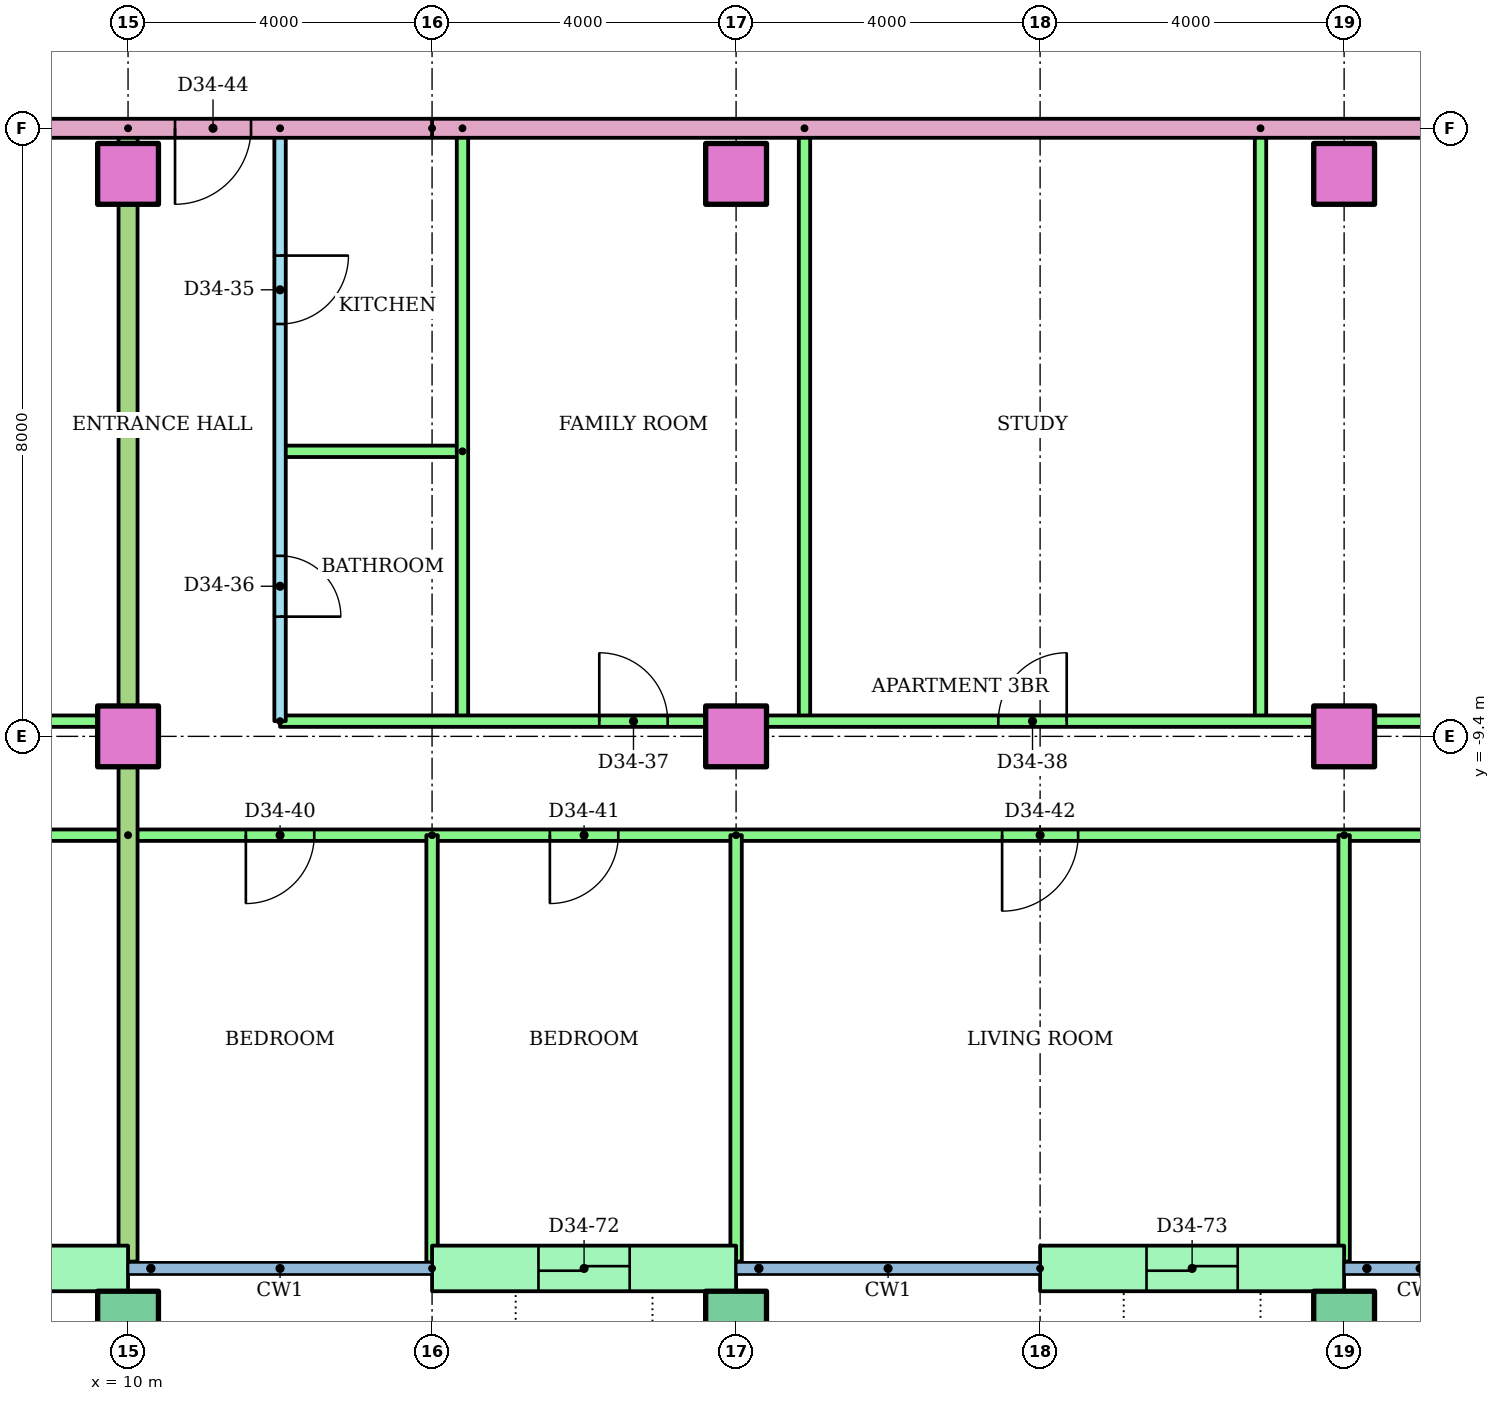
"""IFC4 building model, lengths in metres.
Left out: names, types, materials, properties, quantities, classifications, styles, units other than length and angle.
Written with IfcOpenShell. Run it as: python <this file> out.ifc"""

import sys

from ifc_helpers import new_model, si_unit, direction, frame, frame_2d, origin, origin_2d, place, context, subcontext, project, spatial, rectangle, hollow_rectangle, extrude, element, fill, save


model = new_model("IFC4")
c1 = context("Model", 3, precision=1e-05, world=origin(), true_north=direction((0.0, 1.0)))
c2 = subcontext(c1, "Body", "Model", "MODEL_VIEW")
j1 = project(units=[si_unit("LENGTHUNIT", "METRE"), si_unit("PLANEANGLEUNIT", "RADIAN")], contexts=[c1])
p1 = place(None, origin())
s1 = spatial("IfcSite", under=j1, at=p1, CompositionType="ELEMENT")
p2 = place(p1, origin())
s2 = spatial("IfcBuilding", under=s1, at=p2, CompositionType="ELEMENT")
p3 = place(p2, frame((0.0, 0.0, 132.6)))
s3 = spatial("IfcBuildingStorey", under=s2, at=p3, CompositionType="ELEMENT", Elevation=132.6)
for number, where in (
    (1, (10.0, -17.1, 0.0)),
    (2, (18.0, -17.1, 0.0)),
    (3, (26.0, -17.1, 0.0)),
):
    element("IfcColumn", number, at=place(p3, frame(where)), inside=s3, PredefinedType="COLUMN", context=c2, shape_type="SweptSolid", body=[
        extrude(hollow_rectangle(XDim=0.8, YDim=0.8, WallThickness=0.04, at=origin_2d()), origin(), (0.0, 0.0, 1.0), 3.2),
    ])
for number, where in (
    (4, (10.0, -9.4, 0.0)),
    (5, (18.0, -9.4, 0.0)),
    (6, (26.0, -9.4, 0.0)),
    (7, (10.0, -2.0, 0.0)),
    (8, (18.0, -2.0, 0.0)),
    (9, (26.0, -2.0, 0.0)),
):
    element("IfcColumn", number, at=place(p3, frame(where)), inside=s3, PredefinedType="COLUMN", context=c2, shape_type="SweptSolid", body=[
        extrude(rectangle(XDim=0.8, YDim=0.8, at=origin_2d()), origin(), (0.0, 0.0, 1.0), 3.2),
    ])
p4 = place(p3, frame((6.0, -16.4, 0.0)))
e10 = element("IfcWall", 10, at=p4, inside=s3, PredefinedType="STANDARD", context=c2, shape_type="SweptSolid", body=[
    extrude(rectangle(XDim=4.0, YDim=0.6, at=frame_2d((2.0, 0.0))), origin(), (0.0, 0.0, 1.0), 2.92),
])
p5 = place(p4, frame((1.4, 0.0, 0.0)))
e11 = element("IfcOpeningElement", 11, at=p5, cuts=e10, PredefinedType="OPENING", context=c2, shape_type="SweptSolid", body=[
    extrude(rectangle(XDim=1.2, YDim=2.1, at=frame_2d((0.6, 1.05))), frame((0.0, 0.31, 0.0), z_axis=(0.0, -1.0, 0.0), x_axis=(1.0, 0.0, 0.0)), (0.0, 0.0, 1.0), 0.62),
])
p6 = place(p3, frame((14.0, -16.4, 0.0)))
e12 = element("IfcWall", 12, at=p6, inside=s3, PredefinedType="STANDARD", context=c2, shape_type="SweptSolid", body=[
    extrude(rectangle(XDim=4.0, YDim=0.6, at=frame_2d((2.0, 0.0))), origin(), (0.0, 0.0, 1.0), 2.92),
])
p7 = place(p6, frame((1.4, 0.0, 0.0)))
e13 = element("IfcOpeningElement", 13, at=p7, cuts=e12, PredefinedType="OPENING", context=c2, shape_type="SweptSolid", body=[
    extrude(rectangle(XDim=1.2, YDim=2.1, at=frame_2d((0.6, 1.05))), frame((0.0, 0.31, 0.0), z_axis=(0.0, -1.0, 0.0), x_axis=(1.0, 0.0, 0.0)), (0.0, 0.0, 1.0), 0.62),
])
p8 = place(p3, frame((22.0, -16.4, 0.0)))
e14 = element("IfcWall", 14, at=p8, inside=s3, PredefinedType="STANDARD", context=c2, shape_type="SweptSolid", body=[
    extrude(rectangle(XDim=4.0, YDim=0.6, at=frame_2d((2.0, 0.0))), origin(), (0.0, 0.0, 1.0), 2.92),
])
p9 = place(p8, frame((1.4, 0.0, 0.0)))
e15 = element("IfcOpeningElement", 15, at=p9, cuts=e14, PredefinedType="OPENING", context=c2, shape_type="SweptSolid", body=[
    extrude(rectangle(XDim=1.2, YDim=2.1, at=frame_2d((0.6, 1.05))), frame((0.0, 0.31, 0.0), z_axis=(0.0, -1.0, 0.0), x_axis=(1.0, 0.0, 0.0)), (0.0, 0.0, 1.0), 0.62),
])
p10 = place(p3, frame((-4.0, -9.2, 0.0)))
e16 = element("IfcWall", 16, at=p10, inside=s3, PredefinedType="PARTITIONING", context=c2, shape_type="SweptSolid", body=[
    extrude(rectangle(XDim=14.0, YDim=0.15, at=frame_2d((7.0, 0.0))), origin(), (0.0, 0.0, 1.0), 2.4),
])
p11 = place(p10, frame((3.45, 0.0, 0.0)))
e17 = element("IfcOpeningElement", 17, at=p11, cuts=e16, PredefinedType="OPENING", context=c2, shape_type="SweptSolid", body=[
    extrude(rectangle(XDim=0.9, YDim=2.1, at=frame_2d((0.45, 1.05))), frame((0.0, 0.085, 0.0), z_axis=(0.0, -1.0, 0.0), x_axis=(1.0, 0.0, 0.0)), (0.0, 0.0, 1.0), 0.17),
])
p12 = place(p10, frame((6.825, 0.0, 0.0)))
e18 = element("IfcOpeningElement", 18, at=p12, cuts=e16, PredefinedType="OPENING", context=c2, shape_type="SweptSolid", body=[
    extrude(rectangle(XDim=0.9, YDim=2.1, at=frame_2d((0.45, 1.05))), frame((0.0, 0.085, 0.0), z_axis=(0.0, -1.0, 0.0), x_axis=(1.0, 0.0, 0.0)), (0.0, 0.0, 1.0), 0.17),
])
p13 = place(p10, frame((11.125, 0.0, 0.0)))
e19 = element("IfcOpeningElement", 19, at=p13, cuts=e16, PredefinedType="OPENING", context=c2, shape_type="SweptSolid", body=[
    extrude(rectangle(XDim=0.9, YDim=2.1, at=frame_2d((0.45, 1.05))), frame((0.0, 0.085, 0.0), z_axis=(0.0, -1.0, 0.0), x_axis=(1.0, 0.0, 0.0)), (0.0, 0.0, 1.0), 0.17),
])
p14 = place(p3, frame((10.0, -10.7, 0.0), z_axis=(0.0, 0.0, 1.0), x_axis=(-1.0, 0.0, 0.0)))
e20 = element("IfcWall", 20, at=p14, inside=s3, PredefinedType="PARTITIONING", context=c2, shape_type="SweptSolid", body=[
    extrude(rectangle(XDim=16.0, YDim=0.15, at=frame_2d((8.0, 0.0))), origin(), (0.0, 0.0, 1.0), 2.4),
])
p15 = place(p14, frame((13.55, 0.0, 0.0)))
e21 = element("IfcOpeningElement", 21, at=p15, cuts=e20, PredefinedType="OPENING", context=c2, shape_type="SweptSolid", body=[
    extrude(rectangle(XDim=0.9, YDim=2.1, at=frame_2d((0.45, 1.05))), frame((0.0, 0.085, 0.0), z_axis=(0.0, -1.0, 0.0), x_axis=(1.0, 0.0, 0.0)), (0.0, 0.0, 1.0), 0.17),
])
p16 = place(p14, frame((9.55, 0.0, 0.0)))
e22 = element("IfcOpeningElement", 22, at=p16, cuts=e20, PredefinedType="OPENING", context=c2, shape_type="SweptSolid", body=[
    extrude(rectangle(XDim=0.9, YDim=2.1, at=frame_2d((0.45, 1.05))), frame((0.0, 0.085, 0.0), z_axis=(0.0, -1.0, 0.0), x_axis=(1.0, 0.0, 0.0)), (0.0, 0.0, 1.0), 0.17),
])
p17 = place(p14, frame((3.5, 0.0, 0.0)))
e23 = element("IfcOpeningElement", 23, at=p17, cuts=e20, PredefinedType="OPENING", context=c2, shape_type="SweptSolid", body=[
    extrude(rectangle(XDim=1.0, YDim=2.1, at=frame_2d((0.5, 1.05))), frame((0.0, 0.085, 0.0), z_axis=(0.0, -1.0, 0.0), x_axis=(1.0, 0.0, 0.0)), (0.0, 0.0, 1.0), 0.17),
])
p18 = place(p3, frame((12.0, -1.4, 0.0), z_axis=(0.0, 0.0, 1.0), x_axis=(0.0, -1.0, 0.0)))
e24 = element("IfcWall", 24, at=p18, inside=s3, PredefinedType="PARTITIONING", context=c2, shape_type="SweptSolid", body=[
    extrude(rectangle(XDim=7.8, YDim=0.15, at=frame_2d((3.9, 0.0))), origin(), (0.0, 0.0, 1.0), 2.4),
])
p19 = place(p18, frame((1.675, 0.0, 0.0)))
e25 = element("IfcOpeningElement", 25, at=p19, cuts=e24, PredefinedType="OPENING", context=c2, shape_type="SweptSolid", body=[
    extrude(rectangle(XDim=0.9, YDim=2.1, at=frame_2d((0.45, 1.05))), frame((0.0, 0.085, 0.0), z_axis=(0.0, -1.0, 0.0), x_axis=(1.0, 0.0, 0.0)), (0.0, 0.0, 1.0), 0.17),
])
p20 = place(p18, frame((5.625, 0.0, 0.0)))
e26 = element("IfcOpeningElement", 26, at=p20, cuts=e24, PredefinedType="OPENING", context=c2, shape_type="SweptSolid", body=[
    extrude(rectangle(XDim=0.8, YDim=2.1, at=frame_2d((0.4, 1.05))), frame((0.0, 0.085, 0.0), z_axis=(0.0, -1.0, 0.0), x_axis=(1.0, 0.0, 0.0)), (0.0, 0.0, 1.0), 0.17),
])
p21 = place(p3, frame((14.4, -5.65, 0.0), z_axis=(0.0, 0.0, 1.0), x_axis=(-1.0, 0.0, 0.0)))
e27 = element("IfcWall", 27, at=p21, inside=s3, PredefinedType="PARTITIONING", context=c2, shape_type="SweptSolid", body=[
    extrude(rectangle(XDim=2.4, YDim=0.15, at=frame_2d((1.2, 0.0))), origin(), (0.0, 0.0, 1.0), 2.4),
])
for number, where, z_axis, x_axis in (
    (28, (14.4, -1.4, 0.0), (0.0, 0.0, 1.0), (0.0, -1.0, 0.0)),
    (29, (18.9, -1.4, 0.0), (0.0, 0.0, 1.0), (0.0, -1.0, 0.0)),
    (30, (24.9, -1.4, 0.0), (0.0, 0.0, 1.0), (0.0, -1.0, 0.0)),
):
    element("IfcWall", number, at=place(p3, frame(where, z_axis=z_axis, x_axis=x_axis)), inside=s3, PredefinedType="PARTITIONING", context=c2, shape_type="SweptSolid", body=[
        extrude(rectangle(XDim=7.8, YDim=0.15, at=frame_2d((3.9, 0.0))), origin(), (0.0, 0.0, 1.0), 2.4),
    ])
p22 = place(p3, frame((12.0, -9.2, 0.0)))
e31 = element("IfcWall", 31, at=p22, inside=s3, PredefinedType="PARTITIONING", context=c2, shape_type="SweptSolid", body=[
    extrude(rectangle(XDim=20.72, YDim=0.15, at=frame_2d((10.36, 0.0))), origin(), (0.0, 0.0, 1.0), 2.4),
])
p23 = place(p22, frame((4.2, 0.0, 0.0)))
e32 = element("IfcOpeningElement", 32, at=p23, cuts=e31, PredefinedType="OPENING", context=c2, shape_type="SweptSolid", body=[
    extrude(rectangle(XDim=0.9, YDim=2.1, at=frame_2d((0.45, 1.05))), frame((0.0, 0.085, 0.0), z_axis=(0.0, -1.0, 0.0), x_axis=(1.0, 0.0, 0.0)), (0.0, 0.0, 1.0), 0.17),
])
p24 = place(p22, frame((9.45, 0.0, 0.0)))
e33 = element("IfcOpeningElement", 33, at=p24, cuts=e31, PredefinedType="OPENING", context=c2, shape_type="SweptSolid", body=[
    extrude(rectangle(XDim=0.9, YDim=2.1, at=frame_2d((0.45, 1.05))), frame((0.0, 0.085, 0.0), z_axis=(0.0, -1.0, 0.0), x_axis=(1.0, 0.0, 0.0)), (0.0, 0.0, 1.0), 0.17),
])
p25 = place(p22, frame((16.25, 0.0, 0.0)))
e34 = element("IfcOpeningElement", 34, at=p25, cuts=e31, PredefinedType="OPENING", context=c2, shape_type="SweptSolid", body=[
    extrude(rectangle(XDim=0.9, YDim=2.1, at=frame_2d((0.45, 1.05))), frame((0.0, 0.085, 0.0), z_axis=(0.0, -1.0, 0.0), x_axis=(1.0, 0.0, 0.0)), (0.0, 0.0, 1.0), 0.17),
])
p26 = place(p3, frame((32.72, -10.7, 0.0), z_axis=(0.0, 0.0, 1.0), x_axis=(-1.0, 0.0, 0.0)))
e35 = element("IfcWall", 35, at=p26, inside=s3, PredefinedType="PARTITIONING", context=c2, shape_type="SweptSolid", body=[
    extrude(rectangle(XDim=22.72, YDim=0.15, at=frame_2d((11.36, 0.0))), origin(), (0.0, 0.0, 1.0), 2.4),
])
p27 = place(p26, frame((20.27, 0.0, 0.0)))
e36 = element("IfcOpeningElement", 36, at=p27, cuts=e35, PredefinedType="OPENING", context=c2, shape_type="SweptSolid", body=[
    extrude(rectangle(XDim=0.9, YDim=2.1, at=frame_2d((0.45, 1.05))), frame((0.0, 0.085, 0.0), z_axis=(0.0, -1.0, 0.0), x_axis=(1.0, 0.0, 0.0)), (0.0, 0.0, 1.0), 0.17),
])
p28 = place(p26, frame((16.27, 0.0, 0.0)))
e37 = element("IfcOpeningElement", 37, at=p28, cuts=e35, PredefinedType="OPENING", context=c2, shape_type="SweptSolid", body=[
    extrude(rectangle(XDim=0.9, YDim=2.1, at=frame_2d((0.45, 1.05))), frame((0.0, 0.085, 0.0), z_axis=(0.0, -1.0, 0.0), x_axis=(1.0, 0.0, 0.0)), (0.0, 0.0, 1.0), 0.17),
])
p29 = place(p26, frame((10.22, 0.0, 0.0)))
e38 = element("IfcOpeningElement", 38, at=p29, cuts=e35, PredefinedType="OPENING", context=c2, shape_type="SweptSolid", body=[
    extrude(rectangle(XDim=1.0, YDim=2.1, at=frame_2d((0.5, 1.05))), frame((0.0, 0.085, 0.0), z_axis=(0.0, -1.0, 0.0), x_axis=(1.0, 0.0, 0.0)), (0.0, 0.0, 1.0), 0.17),
])
p30 = place(p26, frame((3.02, 0.0, 0.0)))
e39 = element("IfcOpeningElement", 39, at=p30, cuts=e35, PredefinedType="OPENING", context=c2, shape_type="SweptSolid", body=[
    extrude(rectangle(XDim=0.9, YDim=2.1, at=frame_2d((0.45, 1.05))), frame((0.0, 0.085, 0.0), z_axis=(0.0, -1.0, 0.0), x_axis=(1.0, 0.0, 0.0)), (0.0, 0.0, 1.0), 0.17),
])
p31 = place(p3, frame((14.0, -10.7, 0.0), z_axis=(0.0, 0.0, 1.0), x_axis=(0.0, -1.0, 0.0)))
e40 = element("IfcWall", 40, at=p31, inside=s3, PredefinedType="PARTITIONING", context=c2, shape_type="SweptSolid", body=[
    extrude(rectangle(XDim=5.621, YDim=0.15, at=frame_2d((2.811, 0.0))), origin(), (0.0, 0.0, 1.0), 2.4),
])
for number, where, z_axis, x_axis in (
    (41, (18.0, -10.7, 0.0), (0.0, 0.0, 1.0), (0.0, -1.0, 0.0)),
    (42, (26.0, -10.7, 0.0), (0.0, 0.0, 1.0), (0.0, -1.0, 0.0)),
):
    element("IfcWall", number, at=place(p3, frame(where, z_axis=z_axis, x_axis=x_axis)), inside=s3, PredefinedType="PARTITIONING", context=c2, shape_type="SweptSolid", body=[
        extrude(rectangle(XDim=5.61, YDim=0.15, at=frame_2d((2.805, 0.0))), origin(), (0.0, 0.0, 1.0), 2.4),
    ])
p32 = place(p3, frame((10.0, -1.4, 0.0), z_axis=(0.0, 0.0, 1.0), x_axis=(0.0, -1.0, 0.0)))
e43 = element("IfcWall", 43, at=p32, inside=s3, PredefinedType="PARTITIONING", context=c2, shape_type="SweptSolid", body=[
    extrude(rectangle(XDim=14.91, YDim=0.25, at=frame_2d((7.455, 0.0))), origin(), (0.0, 0.0, 1.0), 2.4),
])
p33 = place(p3, frame((29.0, -1.4, 0.0), z_axis=(0.0, 0.0, 1.0), x_axis=(-1.0, 0.0, 0.0)))
e44 = element("IfcWall", 44, at=p33, inside=s3, PredefinedType="PARTITIONING", context=c2, shape_type="SweptSolid", body=[
    extrude(rectangle(XDim=15.0, YDim=0.25, at=frame_2d((7.5, 0.0))), origin(), (0.0, 0.0, 1.0), 2.4),
])
p34 = place(p3, frame((14.0, -1.4, 0.0), z_axis=(0.0, 0.0, 1.0), x_axis=(-1.0, 0.0, 0.0)))
e45 = element("IfcWall", 45, at=p34, inside=s3, PredefinedType="PARTITIONING", context=c2, shape_type="SweptSolid", body=[
    extrude(rectangle(XDim=28.0, YDim=0.25, at=frame_2d((14.0, 0.0))), origin(), (0.0, 0.0, 1.0), 2.4),
])
p35 = place(p34, frame((20.618, 0.0, 0.0)))
e46 = element("IfcOpeningElement", 46, at=p35, cuts=e45, PredefinedType="OPENING", context=c2, shape_type="SweptSolid", body=[
    extrude(rectangle(XDim=1.0, YDim=2.1, at=frame_2d((0.5, 1.05))), frame((0.0, 0.135, 0.0), z_axis=(0.0, -1.0, 0.0), x_axis=(1.0, 0.0, 0.0)), (0.0, 0.0, 1.0), 0.27),
])
p36 = place(p34, frame((18.382, 0.0, 0.0)))
e47 = element("IfcOpeningElement", 47, at=p36, cuts=e45, PredefinedType="OPENING", context=c2, shape_type="SweptSolid", body=[
    extrude(rectangle(XDim=1.0, YDim=2.1, at=frame_2d((0.5, 1.05))), frame((0.0, 0.135, 0.0), z_axis=(0.0, -1.0, 0.0), x_axis=(1.0, 0.0, 0.0)), (0.0, 0.0, 1.0), 0.27),
])
p37 = place(p34, frame((2.382, 0.0, 0.0)))
e48 = element("IfcOpeningElement", 48, at=p37, cuts=e45, PredefinedType="OPENING", context=c2, shape_type="SweptSolid", body=[
    extrude(rectangle(XDim=1.0, YDim=2.1, at=frame_2d((0.5, 1.05))), frame((0.0, 0.135, 0.0), z_axis=(0.0, -1.0, 0.0), x_axis=(1.0, 0.0, 0.0)), (0.0, 0.0, 1.0), 0.27),
])
p38 = place(p19, origin())
e49 = element("IfcDoor", 49, at=p38, inside=s3, OperationType="SINGLE_SWING_LEFT", PredefinedType="DOOR", context=c2, shape_type="SweptSolid", body=[
    extrude(rectangle(XDim=0.9, YDim=2.1, at=frame_2d((0.45, 1.05))), frame((0.0, 0.025, 0.0), z_axis=(0.0, -1.0, 0.0), x_axis=(1.0, 0.0, 0.0)), (0.0, 0.0, 1.0), 0.05),
])
fill(e25, e49)
p39 = place(p20, origin())
e50 = element("IfcDoor", 50, at=p39, inside=s3, OperationType="SINGLE_SWING_RIGHT", PredefinedType="DOOR", context=c2, shape_type="SweptSolid", body=[
    extrude(rectangle(XDim=0.8, YDim=2.1, at=frame_2d((0.4, 1.05))), frame((0.0, 0.025, 0.0), z_axis=(0.0, -1.0, 0.0), x_axis=(1.0, 0.0, 0.0)), (0.0, 0.0, 1.0), 0.05),
])
fill(e26, e50)
p40 = place(p23, origin())
e51 = element("IfcDoor", 51, at=p40, inside=s3, OperationType="SINGLE_SWING_LEFT", PredefinedType="DOOR", context=c2, shape_type="SweptSolid", body=[
    extrude(rectangle(XDim=0.9, YDim=2.1, at=frame_2d((0.45, 1.05))), frame((0.0, 0.025, 0.0), z_axis=(0.0, -1.0, 0.0), x_axis=(1.0, 0.0, 0.0)), (0.0, 0.0, 1.0), 0.05),
])
fill(e32, e51)
p41 = place(p24, origin())
e52 = element("IfcDoor", 52, at=p41, inside=s3, OperationType="SINGLE_SWING_RIGHT", PredefinedType="DOOR", context=c2, shape_type="SweptSolid", body=[
    extrude(rectangle(XDim=0.9, YDim=2.1, at=frame_2d((0.45, 1.05))), frame((0.0, 0.025, 0.0), z_axis=(0.0, -1.0, 0.0), x_axis=(1.0, 0.0, 0.0)), (0.0, 0.0, 1.0), 0.05),
])
fill(e33, e52)
p42 = place(p27, origin())
e53 = element("IfcDoor", 53, at=p42, inside=s3, OperationType="SINGLE_SWING_RIGHT", PredefinedType="DOOR", context=c2, shape_type="SweptSolid", body=[
    extrude(rectangle(XDim=0.9, YDim=2.1, at=frame_2d((0.45, 1.05))), frame((0.0, 0.025, 0.0), z_axis=(0.0, -1.0, 0.0), x_axis=(1.0, 0.0, 0.0)), (0.0, 0.0, 1.0), 0.05),
])
fill(e36, e53)
p43 = place(p28, origin())
e54 = element("IfcDoor", 54, at=p43, inside=s3, OperationType="SINGLE_SWING_RIGHT", PredefinedType="DOOR", context=c2, shape_type="SweptSolid", body=[
    extrude(rectangle(XDim=0.9, YDim=2.1, at=frame_2d((0.45, 1.05))), frame((0.0, 0.025, 0.0), z_axis=(0.0, -1.0, 0.0), x_axis=(1.0, 0.0, 0.0)), (0.0, 0.0, 1.0), 0.05),
])
fill(e37, e54)
p44 = place(p29, origin())
e55 = element("IfcDoor", 55, at=p44, inside=s3, OperationType="SINGLE_SWING_RIGHT", PredefinedType="DOOR", context=c2, shape_type="SweptSolid", body=[
    extrude(rectangle(XDim=1.0, YDim=2.1, at=frame_2d((0.5, 1.05))), frame((0.0, 0.025, 0.0), z_axis=(0.0, -1.0, 0.0), x_axis=(1.0, 0.0, 0.0)), (0.0, 0.0, 1.0), 0.05),
])
fill(e38, e55)
p45 = place(p37, origin())
e56 = element("IfcDoor", 56, at=p45, inside=s3, OperationType="SINGLE_SWING_RIGHT", PredefinedType="DOOR", context=c2, shape_type="SweptSolid", body=[
    extrude(rectangle(XDim=1.0, YDim=2.1, at=frame_2d((0.5, 1.05))), frame((0.0, 0.025, 0.0), z_axis=(0.0, -1.0, 0.0), x_axis=(1.0, 0.0, 0.0)), (0.0, 0.0, 1.0), 0.05),
])
fill(e48, e56)
p46 = place(p7, origin())
e57 = element("IfcDoor", 57, at=p46, inside=s3, OperationType="SLIDING_TO_LEFT", PredefinedType="DOOR", context=c2, shape_type="SweptSolid", body=[
    extrude(rectangle(XDim=1.2, YDim=2.1, at=frame_2d((0.6, 1.05))), frame((0.0, 0.025, 0.0), z_axis=(0.0, -1.0, 0.0), x_axis=(1.0, 0.0, 0.0)), (0.0, 0.0, 1.0), 0.05),
])
fill(e13, e57)
p47 = place(p9, origin())
e58 = element("IfcDoor", 58, at=p47, inside=s3, OperationType="SLIDING_TO_LEFT", PredefinedType="DOOR", context=c2, shape_type="SweptSolid", body=[
    extrude(rectangle(XDim=1.2, YDim=2.1, at=frame_2d((0.6, 1.05))), frame((0.0, 0.025, 0.0), z_axis=(0.0, -1.0, 0.0), x_axis=(1.0, 0.0, 0.0)), (0.0, 0.0, 1.0), 0.05),
])
fill(e15, e58)
save(model, sys.argv[1])
